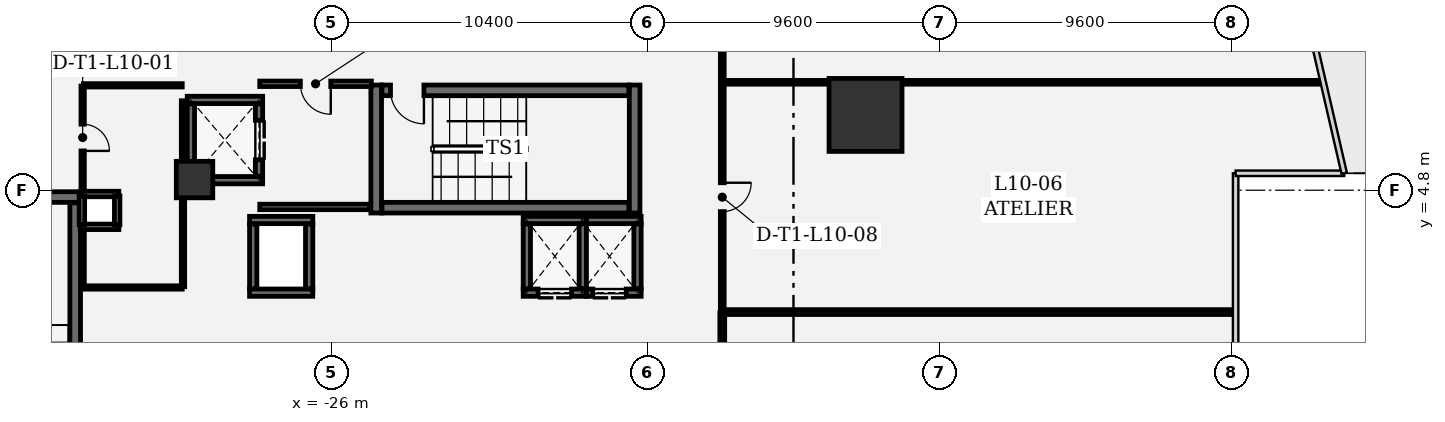
"""IFC4 building model, lengths in metres.
Left out: names, types, materials, properties, quantities, classifications, styles, units other than length and angle.
Written with IfcOpenShell. Run it as: python <this file> out.ifc"""

import sys

from ifc_helpers import new_model, si_unit, direction, frame, frame_2d, origin, origin_2d, place, context, subcontext, project, spatial, rectangle, extrude, element, fill, save


model = new_model("IFC4")
c1 = context("Model", 3, precision=1e-05, world=origin(), true_north=direction((0.0, 1.0)))
c2 = subcontext(c1, "Body", "Model", "MODEL_VIEW")
j1 = project(units=[si_unit("LENGTHUNIT", "METRE"), si_unit("PLANEANGLEUNIT", "RADIAN")], contexts=[c1])
p1 = place(None, origin())
s1 = spatial("IfcSite", under=j1, at=p1, CompositionType="ELEMENT")
p2 = place(p1, origin())
s2 = spatial("IfcBuilding", under=s1, at=p2, CompositionType="ELEMENT")
p3 = place(p2, frame((0.0, 0.0, 49.2)))
s3 = spatial("IfcBuildingStorey", under=s2, at=p3, CompositionType="ELEMENT", Elevation=49.2)
p4 = place(p3, frame((-8.43, 7.276, 0.0), z_axis=(0.0, 0.0, 1.0), x_axis=(1.0, 0.0, 0.0)))
e1 = element("IfcColumn", 1, at=p4, inside=s3, PredefinedType="COLUMN", context=c2, shape_type="SweptSolid", body=[
    extrude(rectangle(XDim=2.4, YDim=2.4, at=origin_2d()), origin(), (0.0, 0.0, 1.0), 4.2),
])
p5 = place(p3, frame((-30.5, 5.15, 0.0), z_axis=(0.0, 0.0, 1.0), x_axis=(1.0, 0.0, 0.0)))
e2 = element("IfcColumn", 2, at=p5, inside=s3, PredefinedType="COLUMN", context=c2, shape_type="SweptSolid", body=[
    extrude(rectangle(XDim=1.2, YDim=1.2, at=origin_2d()), origin(), (0.0, 0.0, 1.0), 4.2),
])
for number, where, z_axis, x_axis in (
    (3, (-24.525, 8.26, 0.0), (0.0, 0.0, 1.0), (0.0, -1.0, 0.0)),
    (4, (-16.025, 4.05, 0.0), (0.0, 0.0, 1.0), (0.0, 1.0, 0.0)),
):
    element("IfcWall", number, at=place(p3, frame(where, z_axis=z_axis, x_axis=x_axis)), inside=s3, PredefinedType="SHEAR", context=c2, shape_type="SweptSolid", body=[
        extrude(rectangle(XDim=4.21, YDim=0.35, at=frame_2d((2.105, 0.0))), origin(), (0.0, 0.0, 1.0), 3.92),
    ])
p6 = place(p3, frame((-24.335, 4.225, 0.0), z_axis=(0.0, 0.0, 1.0), x_axis=(1.0, 0.0, 0.0)))
e5 = element("IfcWall", 5, at=p6, inside=s3, PredefinedType="SHEAR", context=c2, shape_type="SweptSolid", body=[
    extrude(rectangle(XDim=8.12, YDim=0.35, at=frame_2d((4.06, 0.0))), origin(), (0.0, 0.0, 1.0), 3.92),
])
p7 = place(p3, frame((-16.215, 8.085, 0.0), z_axis=(0.0, 0.0, 1.0), x_axis=(-1.0, 0.0, 0.0)))
e6 = element("IfcWall", 6, at=p7, inside=s3, PredefinedType="SHEAR", context=c2, shape_type="SweptSolid", body=[
    extrude(rectangle(XDim=8.12, YDim=0.35, at=frame_2d((4.06, 0.0))), origin(), (0.0, 0.0, 1.0), 3.92),
])
p8 = place(p7, frame((6.74, 0.0, 0.0)))
e7 = element("IfcOpeningElement", 7, at=p8, cuts=e6, PredefinedType="OPENING", context=c2, shape_type="SweptSolid", body=[
    extrude(rectangle(XDim=1.1, YDim=2.2, at=frame_2d((0.55, 1.1))), frame((0.0, 0.185, 0.0), z_axis=(0.0, -1.0, 0.0), x_axis=(1.0, 0.0, 0.0)), (0.0, 0.0, 1.0), 0.37),
])
p9 = place(p3, frame((-34.25, 4.575, 0.0), z_axis=(0.0, 0.0, 1.0), x_axis=(-1.0, 0.0, 0.0)))
e8 = element("IfcWall", 8, at=p9, inside=s3, PredefinedType="SHEAR", context=c2, shape_type="SweptSolid", body=[
    extrude(rectangle(XDim=4.21, YDim=0.35, at=frame_2d((2.105, 0.0))), origin(), (0.0, 0.0, 1.0), 3.92),
])
p10 = place(p3, frame((-34.425, -4.385, 0.0), z_axis=(0.0, 0.0, 1.0), x_axis=(0.0, 1.0, 0.0)))
e9 = element("IfcWall", 9, at=p10, inside=s3, PredefinedType="SHEAR", context=c2, shape_type="SweptSolid", body=[
    extrude(rectangle(XDim=8.77, YDim=0.35, at=frame_2d((4.385, 0.0))), origin(), (0.0, 0.0, 1.0), 3.92),
])
for number, where, z_axis, x_axis in (
    (10, (-28.26, 5.13, 0.0), (0.0, 0.0, 1.0), (-1.0, 0.0, 0.0)),
    (11, (-30.74, 7.77, 0.0), (0.0, 0.0, 1.0), (1.0, 0.0, 0.0)),
):
    element("IfcWall", number, at=place(p3, frame(where, z_axis=z_axis, x_axis=x_axis)), inside=s3, PredefinedType="SHEAR", context=c2, shape_type="SweptSolid", body=[
        extrude(rectangle(XDim=2.48, YDim=0.24, at=frame_2d((1.24, 0.0))), origin(), (0.0, 0.0, 1.0), 3.92),
    ])
p11 = place(p3, frame((-30.62, 5.262, 0.0), z_axis=(0.0, 0.0, 1.0), x_axis=(0.0, 1.0, 0.0)))
e12 = element("IfcWall", 12, at=p11, inside=s3, PredefinedType="SHEAR", context=c2, shape_type="SweptSolid", body=[
    extrude(rectangle(XDim=2.376, YDim=0.24, at=frame_2d((1.188, 0.0))), origin(), (0.0, 0.0, 1.0), 3.92),
])
p12 = place(p3, frame((-28.38, 7.638, 0.0), z_axis=(0.0, 0.0, 1.0), x_axis=(0.0, -1.0, 0.0)))
e13 = element("IfcWall", 13, at=p12, inside=s3, PredefinedType="SHEAR", context=c2, shape_type="SweptSolid", body=[
    extrude(rectangle(XDim=2.376, YDim=0.24, at=frame_2d((1.188, 0.0))), origin(), (0.0, 0.0, 1.0), 3.92),
])
p13 = place(p12, frame((0.538, 0.0, 0.0)))
e14 = element("IfcOpeningElement", 14, at=p13, cuts=e13, PredefinedType="OPENING", context=c2, shape_type="SweptSolid", body=[
    extrude(rectangle(XDim=1.3, YDim=2.3, at=frame_2d((0.65, 1.15))), frame((0.0, 0.13, 0.0), z_axis=(0.0, -1.0, 0.0), x_axis=(1.0, 0.0, 0.0)), (0.0, 0.0, 1.0), 0.26),
])
for number, where, z_axis, x_axis in (
    (15, (-26.61, 1.43, 0.0), (0.0, 0.0, 1.0), (-1.0, 0.0, 0.0)),
    (16, (-28.69, 3.82, 0.0), (0.0, 0.0, 1.0), (1.0, 0.0, 0.0)),
):
    element("IfcWall", number, at=place(p3, frame(where, z_axis=z_axis, x_axis=x_axis)), inside=s3, PredefinedType="SHEAR", context=c2, shape_type="SweptSolid", body=[
        extrude(rectangle(XDim=2.08, YDim=0.24, at=frame_2d((1.04, 0.0))), origin(), (0.0, 0.0, 1.0), 3.92),
    ])
for number, where, z_axis, x_axis in (
    (17, (-28.57, 1.562, 0.0), (0.0, 0.0, 1.0), (0.0, 1.0, 0.0)),
    (18, (-26.73, 3.688, 0.0), (0.0, 0.0, 1.0), (0.0, -1.0, 0.0)),
):
    element("IfcWall", number, at=place(p3, frame(where, z_axis=z_axis, x_axis=x_axis)), inside=s3, PredefinedType="SHEAR", context=c2, shape_type="SweptSolid", body=[
        extrude(rectangle(XDim=2.126, YDim=0.24, at=frame_2d((1.063, 0.0))), origin(), (0.0, 0.0, 1.0), 3.92),
    ])
p14 = place(p3, frame((-17.61, 1.43, 0.0), z_axis=(0.0, 0.0, 1.0), x_axis=(-1.0, 0.0, 0.0)))
e19 = element("IfcWall", 19, at=p14, inside=s3, PredefinedType="SHEAR", context=c2, shape_type="SweptSolid", body=[
    extrude(rectangle(XDim=2.08, YDim=0.24, at=frame_2d((1.04, 0.0))), origin(), (0.0, 0.0, 1.0), 3.92),
])
p15 = place(p14, frame((0.49, 0.0, 0.0)))
e20 = element("IfcOpeningElement", 20, at=p15, cuts=e19, PredefinedType="OPENING", context=c2, shape_type="SweptSolid", body=[
    extrude(rectangle(XDim=1.1, YDim=2.2, at=frame_2d((0.55, 1.1))), frame((0.0, 0.13, 0.0), z_axis=(0.0, -1.0, 0.0), x_axis=(1.0, 0.0, 0.0)), (0.0, 0.0, 1.0), 0.26),
])
p16 = place(p3, frame((-19.69, 3.82, 0.0), z_axis=(0.0, 0.0, 1.0), x_axis=(1.0, 0.0, 0.0)))
e21 = element("IfcWall", 21, at=p16, inside=s3, PredefinedType="SHEAR", context=c2, shape_type="SweptSolid", body=[
    extrude(rectangle(XDim=2.08, YDim=0.24, at=frame_2d((1.04, 0.0))), origin(), (0.0, 0.0, 1.0), 3.92),
])
for number, where, z_axis, x_axis in (
    (22, (-19.57, 1.562, 0.0), (0.0, 0.0, 1.0), (0.0, 1.0, 0.0)),
    (23, (-17.73, 3.688, 0.0), (0.0, 0.0, 1.0), (0.0, -1.0, 0.0)),
):
    element("IfcWall", number, at=place(p3, frame(where, z_axis=z_axis, x_axis=x_axis)), inside=s3, PredefinedType="SHEAR", context=c2, shape_type="SweptSolid", body=[
        extrude(rectangle(XDim=2.126, YDim=0.24, at=frame_2d((1.063, 0.0))), origin(), (0.0, 0.0, 1.0), 3.92),
    ])
p17 = place(p3, frame((-15.81, 1.43, 0.0), z_axis=(0.0, 0.0, 1.0), x_axis=(-1.0, 0.0, 0.0)))
e24 = element("IfcWall", 24, at=p17, inside=s3, PredefinedType="SHEAR", context=c2, shape_type="SweptSolid", body=[
    extrude(rectangle(XDim=1.8, YDim=0.24, at=frame_2d((0.9, 0.0))), origin(), (0.0, 0.0, 1.0), 3.92),
])
p18 = place(p17, frame((0.49, 0.0, 0.0)))
e25 = element("IfcOpeningElement", 25, at=p18, cuts=e24, PredefinedType="OPENING", context=c2, shape_type="SweptSolid", body=[
    extrude(rectangle(XDim=1.1, YDim=2.2, at=frame_2d((0.55, 1.1))), frame((0.0, 0.13, 0.0), z_axis=(0.0, -1.0, 0.0), x_axis=(1.0, 0.0, 0.0)), (0.0, 0.0, 1.0), 0.26),
])
p19 = place(p3, frame((-17.61, 3.82, 0.0), z_axis=(0.0, 0.0, 1.0), x_axis=(1.0, 0.0, 0.0)))
e26 = element("IfcWall", 26, at=p19, inside=s3, PredefinedType="SHEAR", context=c2, shape_type="SweptSolid", body=[
    extrude(rectangle(XDim=1.8, YDim=0.24, at=frame_2d((0.9, 0.0))), origin(), (0.0, 0.0, 1.0), 3.92),
])
p20 = place(p3, frame((-15.93, 3.688, 0.0), z_axis=(0.0, 0.0, 1.0), x_axis=(0.0, -1.0, 0.0)))
e27 = element("IfcWall", 27, at=p20, inside=s3, PredefinedType="SHEAR", context=c2, shape_type="SweptSolid", body=[
    extrude(rectangle(XDim=2.126, YDim=0.24, at=frame_2d((1.063, 0.0))), origin(), (0.0, 0.0, 1.0), 3.92),
])
for number, where, z_axis, x_axis in (
    (28, (-32.99, 3.595, 0.0), (0.0, 0.0, 1.0), (-1.0, 0.0, 0.0)),
    (29, (-34.26, 4.675, 0.0), (0.0, 0.0, 1.0), (1.0, 0.0, 0.0)),
):
    element("IfcWall", number, at=place(p3, frame(where, z_axis=z_axis, x_axis=x_axis)), inside=s3, PredefinedType="PARTITIONING", context=c2, shape_type="SweptSolid", body=[
        extrude(rectangle(XDim=1.27, YDim=0.18, at=frame_2d((0.635, 0.0))), origin(), (0.0, 0.0, 1.0), 3.92),
    ])
for number, where, z_axis, x_axis in (
    (30, (-34.205, 3.66, 0.0), (0.0, 0.0, 1.0), (0.0, 1.0, 0.0)),
    (31, (-33.045, 4.61, 0.0), (0.0, 0.0, 1.0), (0.0, -1.0, 0.0)),
):
    element("IfcWall", number, at=place(p3, frame(where, z_axis=z_axis, x_axis=x_axis)), inside=s3, PredefinedType="PARTITIONING", context=c2, shape_type="SweptSolid", body=[
        extrude(rectangle(XDim=0.95, YDim=0.18, at=frame_2d((0.475, 0.0))), origin(), (0.0, 0.0, 1.0), 3.92),
    ])
p21 = place(p3, frame((-28.355, 4.25, 0.0), z_axis=(0.0, 0.0, 1.0), x_axis=(1.0, 0.0, 0.0)))
e32 = element("IfcWall", 32, at=p21, inside=s3, PredefinedType="PARTITIONING", context=c2, shape_type="SweptSolid", body=[
    extrude(rectangle(XDim=3.622, YDim=0.18, at=frame_2d((1.811, 0.0))), origin(), (0.0, 0.0, 1.0), 3.92),
])
p22 = place(p3, frame((-24.684, 8.3, 0.0), z_axis=(0.0, 0.0, 1.0), x_axis=(-1.0, 0.0, 0.0)))
e33 = element("IfcWall", 33, at=p22, inside=s3, PredefinedType="PARTITIONING", context=c2, shape_type="SweptSolid", body=[
    extrude(rectangle(XDim=3.671, YDim=0.18, at=frame_2d((1.835, 0.0))), origin(), (0.0, 0.0, 1.0), 3.92),
])
p23 = place(p22, frame((1.335, 0.0, 0.0)))
e34 = element("IfcOpeningElement", 34, at=p23, cuts=e33, PredefinedType="OPENING", context=c2, shape_type="SweptSolid", body=[
    extrude(rectangle(XDim=1.0, YDim=2.15, at=frame_2d((0.5, 1.075))), frame((0.0, 0.1, 0.0), z_axis=(0.0, -1.0, 0.0), x_axis=(1.0, 0.0, 0.0)), (0.0, 0.0, 1.0), 0.2),
])
p24 = place(p3, frame((-34.155, 1.6, 0.0), z_axis=(0.0, 0.0, 1.0), x_axis=(1.0, 0.0, 0.0)))
e35 = element("IfcWall", 35, at=p24, inside=s3, PredefinedType="PARTITIONING", context=c2, shape_type="SweptSolid", body=[
    extrude(rectangle(XDim=3.25, YDim=0.11, at=frame_2d((1.625, 0.0))), origin(), (0.0, 0.0, 1.0), 3.92),
])
p25 = place(p3, frame((-30.88, 1.625, 0.0), z_axis=(0.0, 0.0, 1.0), x_axis=(0.0, 1.0, 0.0)))
e36 = element("IfcWall", 36, at=p25, inside=s3, PredefinedType="PARTITIONING", context=c2, shape_type="SweptSolid", body=[
    extrude(rectangle(XDim=2.86, YDim=0.11, at=frame_2d((1.43, 0.0))), origin(), (0.0, 0.0, 1.0), 3.92),
])
p26 = place(p3, frame((-30.88, 5.815, 0.0), z_axis=(0.0, 0.0, 1.0), x_axis=(0.0, 1.0, 0.0)))
e37 = element("IfcWall", 37, at=p26, inside=s3, PredefinedType="PARTITIONING", context=c2, shape_type="SweptSolid", body=[
    extrude(rectangle(XDim=1.928, YDim=0.11, at=frame_2d((0.964, 0.0))), origin(), (0.0, 0.0, 1.0), 3.92),
])
p27 = place(p3, frame((-30.905, 8.25, 0.0), z_axis=(0.0, 0.0, 1.0), x_axis=(-1.0, 0.0, 0.0)))
e38 = element("IfcWall", 38, at=p27, inside=s3, PredefinedType="PARTITIONING", context=c2, shape_type="SweptSolid", body=[
    extrude(rectangle(XDim=3.25, YDim=0.11, at=frame_2d((1.625, 0.0))), origin(), (0.0, 0.0, 1.0), 3.92),
])
p28 = place(p3, frame((-34.18, 8.225, 0.0), z_axis=(0.0, 0.0, 1.0), x_axis=(0.0, -1.0, 0.0)))
e39 = element("IfcWall", 39, at=p28, inside=s3, PredefinedType="PARTITIONING", context=c2, shape_type="SweptSolid", body=[
    extrude(rectangle(XDim=3.385, YDim=0.11, at=frame_2d((1.692, 0.0))), origin(), (0.0, 0.0, 1.0), 3.92),
])
p29 = place(p28, frame((1.252, 0.0, 0.0)))
e40 = element("IfcOpeningElement", 40, at=p29, cuts=e39, PredefinedType="OPENING", context=c2, shape_type="SweptSolid", body=[
    extrude(rectangle(XDim=0.88, YDim=2.1, at=frame_2d((0.44, 1.05))), frame((0.0, 0.065, 0.0), z_axis=(0.0, -1.0, 0.0), x_axis=(1.0, 0.0, 0.0)), (0.0, 0.0, 1.0), 0.13),
])
p30 = place(p3, frame((-34.18, 3.43, 0.0), z_axis=(0.0, 0.0, 1.0), x_axis=(0.0, -1.0, 0.0)))
e41 = element("IfcWall", 41, at=p30, inside=s3, PredefinedType="PARTITIONING", context=c2, shape_type="SweptSolid", body=[
    extrude(rectangle(XDim=1.805, YDim=0.11, at=frame_2d((0.902, 0.0))), origin(), (0.0, 0.0, 1.0), 3.92),
])
p31 = place(p3, frame((-13.142, 8.375, 0.0), z_axis=(0.0, 0.0, 1.0), x_axis=(0.0, 1.0, 0.0)))
e42 = element("IfcWall", 42, at=p31, inside=s3, PredefinedType="PARTITIONING", context=c2, shape_type="SweptSolid", body=[
    extrude(rectangle(XDim=2.358, YDim=0.125, at=frame_2d((1.179, 0.0))), origin(), (0.0, 0.0, 1.0), 3.92),
])
p32 = place(p3, frame((-13.117, 8.35, 0.0), z_axis=(0.0, 0.0, 1.0), x_axis=(1.0, 0.0, 0.0)))
e43 = element("IfcWall", 43, at=p32, inside=s3, PredefinedType="PARTITIONING", context=c2, shape_type="SweptSolid", body=[
    extrude(rectangle(XDim=3.422, YDim=0.125, at=frame_2d((1.711, 0.0))), origin(), (0.0, 0.0, 1.0), 2.957),
])
p33 = place(p3, frame((-7.165, 8.35, 0.0), z_axis=(0.0, 0.0, 1.0), x_axis=(1.0, 0.0, 0.0)))
e44 = element("IfcWall", 44, at=p33, inside=s3, PredefinedType="PARTITIONING", context=c2, shape_type="SweptSolid", body=[
    extrude(rectangle(XDim=13.71, YDim=0.125, at=frame_2d((6.855, 0.0))), origin(), (0.0, 0.0, 1.0), 3.92),
])
p34 = place(p3, frame((3.663, 0.791, 0.0), z_axis=(0.0, 0.0, 1.0), x_axis=(-1.0, 0.0, 0.0)))
e45 = element("IfcWall", 45, at=p34, inside=s3, PredefinedType="PARTITIONING", context=c2, shape_type="SweptSolid", body=[
    extrude(rectangle(XDim=16.78, YDim=0.16, at=frame_2d((8.39, 0.0))), origin(), (0.0, 0.0, 1.0), 3.92),
])
p35 = place(p3, frame((-13.142, 0.766, 0.0), z_axis=(0.0, 0.0, 1.0), x_axis=(0.0, -1.0, 0.0)))
e46 = element("IfcWall", 46, at=p35, inside=s3, PredefinedType="PARTITIONING", context=c2, shape_type="SweptSolid", body=[
    extrude(rectangle(XDim=9.283, YDim=0.16, at=frame_2d((4.642, 0.0))), origin(), (0.0, 0.0, 1.0), 3.92),
])
p36 = place(p35, frame((4.167, 0.0, 0.0)))
e47 = element("IfcOpeningElement", 47, at=p36, cuts=e46, PredefinedType="OPENING", context=c2, shape_type="SweptSolid", body=[
    extrude(rectangle(XDim=0.95, YDim=2.15, at=frame_2d((0.475, 1.075))), frame((0.0, 0.09, 0.0), z_axis=(0.0, -1.0, 0.0), x_axis=(1.0, 0.0, 0.0)), (0.0, 0.0, 1.0), 0.18),
])
p37 = place(p3, frame((-13.142, 8.317, 0.0), z_axis=(0.0, 0.0, 1.0), x_axis=(0.0, -1.0, 0.0)))
e48 = element("IfcWall", 48, at=p37, inside=s3, PredefinedType="PARTITIONING", context=c2, shape_type="SweptSolid", body=[
    extrude(rectangle(XDim=7.493, YDim=0.125, at=frame_2d((3.746, 0.0))), origin(), (0.0, 0.0, 1.0), 3.92),
])
p38 = place(p37, frame((3.271, 0.0, 0.0)))
e49 = element("IfcOpeningElement", 49, at=p38, cuts=e48, PredefinedType="OPENING", context=c2, shape_type="SweptSolid", body=[
    extrude(rectangle(XDim=0.95, YDim=2.15, at=frame_2d((0.475, 1.075))), frame((0.0, 0.073, 0.0), z_axis=(0.0, -1.0, 0.0), x_axis=(1.0, 0.0, 0.0)), (0.0, 0.0, 1.0), 0.145),
])
p39 = place(p8, origin())
e50 = element("IfcDoor", 50, at=p39, inside=s3, OperationType="SINGLE_SWING_LEFT", PredefinedType="DOOR", context=c2, shape_type="SweptSolid", body=[
    extrude(rectangle(XDim=1.1, YDim=2.2, at=frame_2d((0.55, 1.1))), frame((0.0, 0.025, 0.0), z_axis=(0.0, -1.0, 0.0), x_axis=(1.0, 0.0, 0.0)), (0.0, 0.0, 1.0), 0.05),
])
fill(e7, e50)
p40 = place(p13, origin())
e51 = element("IfcDoor", 51, at=p40, inside=s3, OperationType="DOUBLE_DOOR_SLIDING", PredefinedType="DOOR", context=c2, shape_type="SweptSolid", body=[
    extrude(rectangle(XDim=1.3, YDim=2.3, at=frame_2d((0.65, 1.15))), frame((0.0, 0.025, 0.0), z_axis=(0.0, -1.0, 0.0), x_axis=(1.0, 0.0, 0.0)), (0.0, 0.0, 1.0), 0.05),
])
fill(e14, e51)
p41 = place(p15, origin())
e52 = element("IfcDoor", 52, at=p41, inside=s3, OperationType="DOUBLE_DOOR_SLIDING", PredefinedType="DOOR", context=c2, shape_type="SweptSolid", body=[
    extrude(rectangle(XDim=1.1, YDim=2.2, at=frame_2d((0.55, 1.1))), frame((0.0, 0.025, 0.0), z_axis=(0.0, -1.0, 0.0), x_axis=(1.0, 0.0, 0.0)), (0.0, 0.0, 1.0), 0.05),
])
fill(e20, e52)
p42 = place(p18, origin())
e53 = element("IfcDoor", 53, at=p42, inside=s3, OperationType="DOUBLE_DOOR_SLIDING", PredefinedType="DOOR", context=c2, shape_type="SweptSolid", body=[
    extrude(rectangle(XDim=1.1, YDim=2.2, at=frame_2d((0.55, 1.1))), frame((0.0, 0.025, 0.0), z_axis=(0.0, -1.0, 0.0), x_axis=(1.0, 0.0, 0.0)), (0.0, 0.0, 1.0), 0.05),
])
fill(e25, e53)
p43 = place(p29, origin())
e54 = element("IfcDoor", 54, at=p43, inside=s3, OperationType="SINGLE_SWING_RIGHT", PredefinedType="DOOR", context=c2, shape_type="SweptSolid", body=[
    extrude(rectangle(XDim=0.88, YDim=2.1, at=frame_2d((0.44, 1.05))), frame((0.0, 0.025, 0.0), z_axis=(0.0, -1.0, 0.0), x_axis=(1.0, 0.0, 0.0)), (0.0, 0.0, 1.0), 0.05),
])
fill(e40, e54)
p44 = place(p38, origin())
e55 = element("IfcDoor", 55, at=p44, inside=s3, OperationType="SINGLE_SWING_LEFT", PredefinedType="DOOR", context=c2, shape_type="SweptSolid", body=[
    extrude(rectangle(XDim=0.95, YDim=2.15, at=frame_2d((0.475, 1.075))), frame((0.0, 0.025, 0.0), z_axis=(0.0, -1.0, 0.0), x_axis=(1.0, 0.0, 0.0)), (0.0, 0.0, 1.0), 0.05),
])
fill(e49, e55)
p45 = place(p23, origin())
e56 = element("IfcDoor", 56, at=p45, inside=s3, OperationType="SINGLE_SWING_LEFT", PredefinedType="DOOR", context=c2, shape_type="SweptSolid", body=[
    extrude(rectangle(XDim=1.0, YDim=2.15, at=frame_2d((0.5, 1.075))), frame((0.0, 0.025, 0.0), z_axis=(0.0, -1.0, 0.0), x_axis=(1.0, 0.0, 0.0)), (0.0, 0.0, 1.0), 0.05),
])
fill(e34, e56)
save(model, sys.argv[1])
